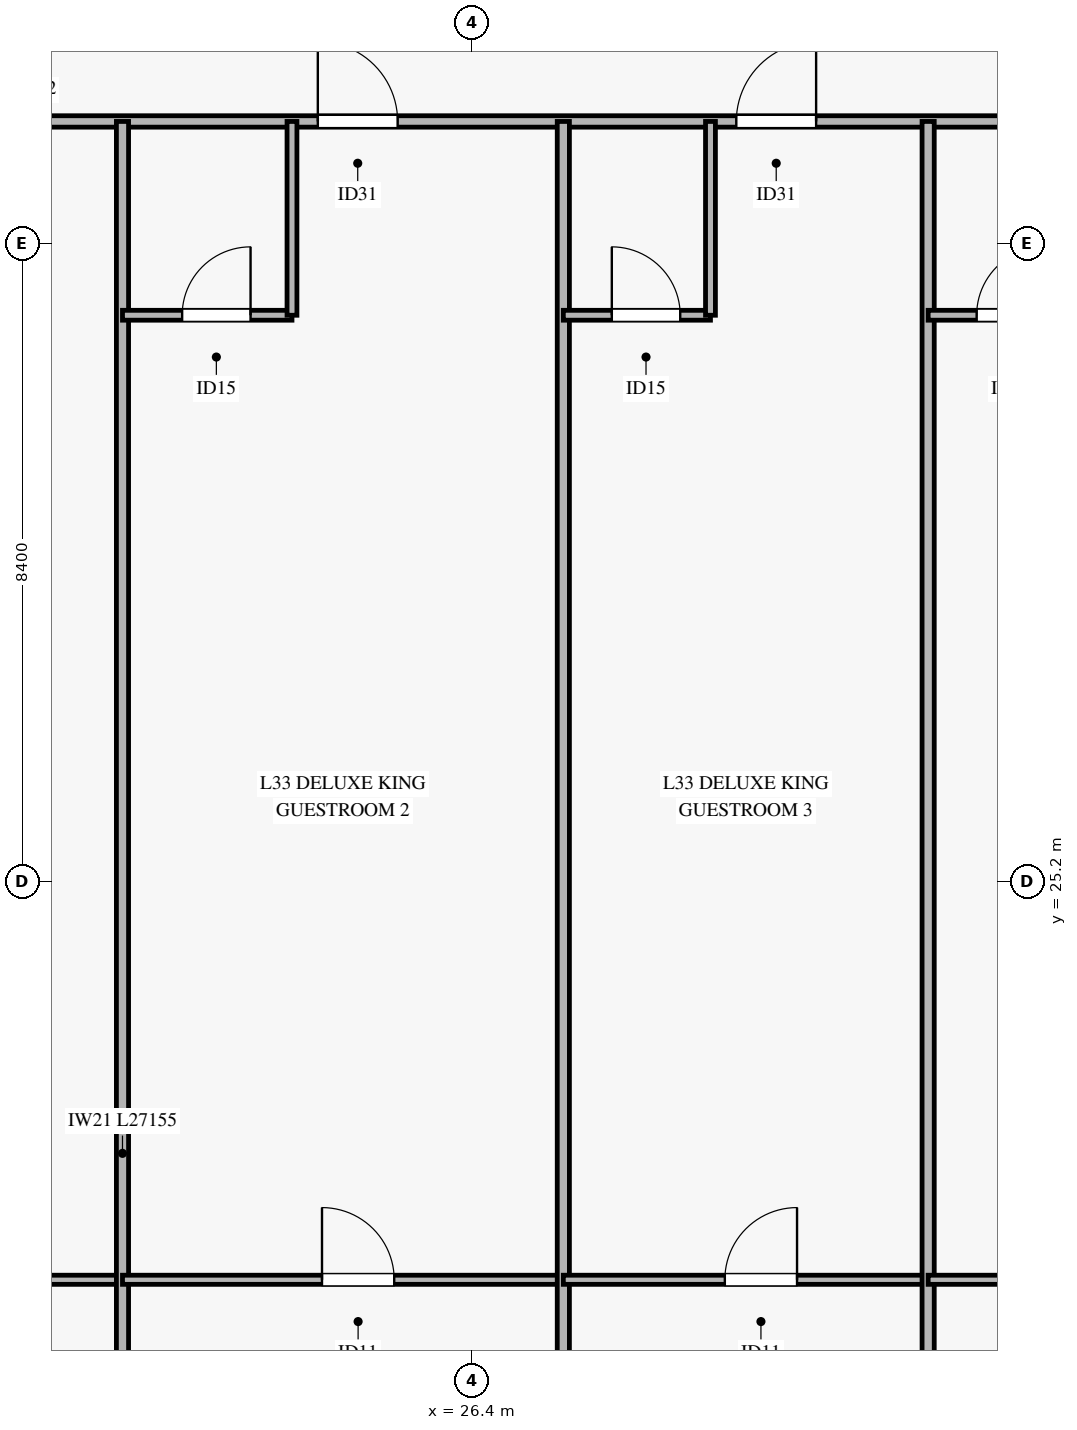
"""IFC4 building model, lengths in metres.
Left out: names, types, materials, properties, quantities, classifications, styles, units other than length and angle.
Written with IfcOpenShell. Run it as: python <this file> out.ifc"""

import sys

from ifc_helpers import new_model, si_unit, direction, frame, frame_2d, origin, place, context, subcontext, project, spatial, rectangle, extrude, source, transform, mapped, element, fill, save


model = new_model("IFC4")
c1 = context("Model", 3, precision=1e-05, world=origin(), true_north=direction((0.0, 1.0)))
c2 = subcontext(c1, "Body", "Model", "MODEL_VIEW")
j1 = project(units=[si_unit("LENGTHUNIT", "METRE"), si_unit("PLANEANGLEUNIT", "RADIAN")], contexts=[c1])
p1 = place(None, origin())
s1 = spatial("IfcSite", under=j1, at=p1, CompositionType="ELEMENT")
p2 = place(p1, origin())
s2 = spatial("IfcBuilding", under=s1, at=p2, CompositionType="ELEMENT")
p3 = place(p2, frame((0.0, 0.0, 137.7)))
s3 = spatial("IfcBuildingStorey", under=s2, at=p3, CompositionType="ELEMENT", Elevation=137.7)
p4 = place(p3, frame((5.214, 35.2, 0.0), z_axis=(0.0, 0.0, 1.0), x_axis=(1.0, 0.0, 0.0)))
e1 = element("IfcWall", 1, at=p4, inside=s3, PredefinedType="PARTITIONING", context=c2, shape_type="SweptSolid", body=[
    extrude(rectangle(XDim=59.972, YDim=0.15, at=frame_2d((29.986, 0.0))), origin(), (0.0, 0.0, 1.0), 2.455),
])
p5 = place(p4, frame((2.77, 0.0, 0.0)))
e2 = element("IfcOpeningElement", 2, at=p5, cuts=e1, PredefinedType="OPENING", context=c2, shape_type="SweptSolid", body=[
    extrude(rectangle(XDim=1.05, YDim=2.15, at=frame_2d((0.525, 1.075))), frame((0.0, 0.085, 0.0), z_axis=(0.0, -1.0, 0.0), x_axis=(1.0, 0.0, 0.0)), (0.0, 0.0, 1.0), 0.17),
])
p6 = place(p4, frame((19.156, 0.0, 0.0)))
e3 = element("IfcOpeningElement", 3, at=p6, cuts=e1, PredefinedType="OPENING", context=c2, shape_type="SweptSolid", body=[
    extrude(rectangle(XDim=1.05, YDim=2.15, at=frame_2d((0.525, 1.075))), frame((0.0, 0.085, 0.0), z_axis=(0.0, -1.0, 0.0), x_axis=(1.0, 0.0, 0.0)), (0.0, 0.0, 1.0), 0.17),
])
p7 = place(p4, frame((24.662, 0.0, 0.0)))
e4 = element("IfcOpeningElement", 4, at=p7, cuts=e1, PredefinedType="OPENING", context=c2, shape_type="SweptSolid", body=[
    extrude(rectangle(XDim=1.05, YDim=2.15, at=frame_2d((0.525, 1.075))), frame((0.0, 0.085, 0.0), z_axis=(0.0, -1.0, 0.0), x_axis=(1.0, 0.0, 0.0)), (0.0, 0.0, 1.0), 0.17),
])
p8 = place(p4, frame((29.462, 0.0, 0.0)))
e5 = element("IfcOpeningElement", 5, at=p8, cuts=e1, PredefinedType="OPENING", context=c2, shape_type="SweptSolid", body=[
    extrude(rectangle(XDim=1.05, YDim=2.15, at=frame_2d((0.525, 1.075))), frame((0.0, 0.085, 0.0), z_axis=(0.0, -1.0, 0.0), x_axis=(1.0, 0.0, 0.0)), (0.0, 0.0, 1.0), 0.17),
])
p9 = place(p4, frame((34.262, 0.0, 0.0)))
e6 = element("IfcOpeningElement", 6, at=p9, cuts=e1, PredefinedType="OPENING", context=c2, shape_type="SweptSolid", body=[
    extrude(rectangle(XDim=1.05, YDim=2.15, at=frame_2d((0.525, 1.075))), frame((0.0, 0.085, 0.0), z_axis=(0.0, -1.0, 0.0), x_axis=(1.0, 0.0, 0.0)), (0.0, 0.0, 1.0), 0.17),
])
p10 = place(p4, frame((38.806, 0.0, 0.0)))
e7 = element("IfcOpeningElement", 7, at=p10, cuts=e1, PredefinedType="OPENING", context=c2, shape_type="SweptSolid", body=[
    extrude(rectangle(XDim=1.05, YDim=2.15, at=frame_2d((0.525, 1.075))), frame((0.0, 0.085, 0.0), z_axis=(0.0, -1.0, 0.0), x_axis=(1.0, 0.0, 0.0)), (0.0, 0.0, 1.0), 0.17),
])
p11 = place(p4, frame((42.956, 0.0, 0.0)))
e8 = element("IfcOpeningElement", 8, at=p11, cuts=e1, PredefinedType="OPENING", context=c2, shape_type="SweptSolid", body=[
    extrude(rectangle(XDim=1.05, YDim=2.15, at=frame_2d((0.525, 1.075))), frame((0.0, 0.085, 0.0), z_axis=(0.0, -1.0, 0.0), x_axis=(1.0, 0.0, 0.0)), (0.0, 0.0, 1.0), 0.17),
])
p12 = place(p3, frame((5.214, 19.959, 0.0), z_axis=(0.0, 0.0, 1.0), x_axis=(1.0, 0.0, 0.0)))
e9 = element("IfcWall", 9, at=p12, inside=s3, PredefinedType="PARTITIONING", context=c2, shape_type="SweptSolid", body=[
    extrude(rectangle(XDim=16.586, YDim=0.12, at=frame_2d((8.293, 0.0))), origin(), (0.0, 0.0, 1.0), 2.455),
])
p13 = place(p12, frame((8.118, 0.0, 0.0)))
e10 = element("IfcOpeningElement", 10, at=p13, cuts=e9, PredefinedType="OPENING", context=c2, shape_type="SweptSolid", body=[
    extrude(rectangle(XDim=0.95, YDim=2.1, at=frame_2d((0.475, 1.05))), frame((0.0, 0.07, 0.0), z_axis=(0.0, -1.0, 0.0), x_axis=(1.0, 0.0, 0.0)), (0.0, 0.0, 1.0), 0.14),
])
p14 = place(p3, frame((21.8, 8.045, 0.0), z_axis=(0.0, 0.0, 1.0), x_axis=(0.0, 1.0, 0.0)))
e11 = element("IfcWall", 11, at=p14, inside=s3, PredefinedType="PARTITIONING", context=c2, shape_type="SweptSolid", body=[
    extrude(rectangle(XDim=27.155, YDim=0.16, at=frame_2d((13.578, 0.0))), origin(), (0.0, 0.0, 1.0), 2.755),
])
p15 = place(p3, frame((21.8, 32.65, 0.0), z_axis=(0.0, 0.0, 1.0), x_axis=(1.0, 0.0, 0.0)))
e12 = element("IfcWall", 12, at=p15, inside=s3, PredefinedType="PARTITIONING", context=c2, shape_type="SweptSolid", body=[
    extrude(rectangle(XDim=2.23, YDim=0.13, at=frame_2d((1.115, 0.0))), origin(), (0.0, 0.0, 1.0), 2.805),
])
p16 = place(p15, frame((0.785, 0.0, 0.0)))
e13 = element("IfcOpeningElement", 13, at=p16, cuts=e12, PredefinedType="OPENING", context=c2, shape_type="SweptSolid", body=[
    extrude(rectangle(XDim=0.9, YDim=2.1, at=frame_2d((0.45, 1.05))), frame((0.0, 0.075, 0.0), z_axis=(0.0, -1.0, 0.0), x_axis=(1.0, 0.0, 0.0)), (0.0, 0.0, 1.0), 0.15),
])
p17 = place(p3, frame((24.03, 32.65, 0.0), z_axis=(0.0, 0.0, 1.0), x_axis=(0.0, 1.0, 0.0)))
e14 = element("IfcWall", 14, at=p17, inside=s3, PredefinedType="PARTITIONING", context=c2, shape_type="SweptSolid", body=[
    extrude(rectangle(XDim=2.55, YDim=0.13, at=frame_2d((1.275, 0.0))), origin(), (0.0, 0.0, 1.0), 3.27),
])
p18 = place(p3, frame((21.8, 19.959, 0.0), z_axis=(0.0, 0.0, 1.0), x_axis=(1.0, 0.0, 0.0)))
e15 = element("IfcWall", 15, at=p18, inside=s3, PredefinedType="PARTITIONING", context=c2, shape_type="SweptSolid", body=[
    extrude(rectangle(XDim=5.8, YDim=0.12, at=frame_2d((2.9, 0.0))), origin(), (0.0, 0.0, 1.0), 3.27),
])
p19 = place(p18, frame((2.625, 0.0, 0.0)))
e16 = element("IfcOpeningElement", 16, at=p19, cuts=e15, PredefinedType="OPENING", context=c2, shape_type="SweptSolid", body=[
    extrude(rectangle(XDim=0.95, YDim=2.1, at=frame_2d((0.475, 1.05))), frame((0.0, 0.07, 0.0), z_axis=(0.0, -1.0, 0.0), x_axis=(1.0, 0.0, 0.0)), (0.0, 0.0, 1.0), 0.14),
])
p20 = place(p3, frame((27.6, 8.045, 0.0), z_axis=(0.0, 0.0, 1.0), x_axis=(0.0, 1.0, 0.0)))
e17 = element("IfcWall", 17, at=p20, inside=s3, PredefinedType="PARTITIONING", context=c2, shape_type="SweptSolid", body=[
    extrude(rectangle(XDim=27.155, YDim=0.16, at=frame_2d((13.578, 0.0))), origin(), (0.0, 0.0, 1.0), 2.755),
])
p21 = place(p3, frame((27.6, 32.65, 0.0), z_axis=(0.0, 0.0, 1.0), x_axis=(1.0, 0.0, 0.0)))
e18 = element("IfcWall", 18, at=p21, inside=s3, PredefinedType="PARTITIONING", context=c2, shape_type="SweptSolid", body=[
    extrude(rectangle(XDim=1.936, YDim=0.13, at=frame_2d((0.968, 0.0))), origin(), (0.0, 0.0, 1.0), 2.805),
])
p22 = place(p21, frame((0.638, 0.0, 0.0)))
e19 = element("IfcOpeningElement", 19, at=p22, cuts=e18, PredefinedType="OPENING", context=c2, shape_type="SweptSolid", body=[
    extrude(rectangle(XDim=0.9, YDim=2.1, at=frame_2d((0.45, 1.05))), frame((0.0, 0.075, 0.0), z_axis=(0.0, -1.0, 0.0), x_axis=(1.0, 0.0, 0.0)), (0.0, 0.0, 1.0), 0.15),
])
p23 = place(p3, frame((29.536, 32.65, 0.0), z_axis=(0.0, 0.0, 1.0), x_axis=(0.0, 1.0, 0.0)))
e20 = element("IfcWall", 20, at=p23, inside=s3, PredefinedType="PARTITIONING", context=c2, shape_type="SweptSolid", body=[
    extrude(rectangle(XDim=2.55, YDim=0.13, at=frame_2d((1.275, 0.0))), origin(), (0.0, 0.0, 1.0), 3.27),
])
p24 = place(p3, frame((27.6, 19.959, 0.0), z_axis=(0.0, 0.0, 1.0), x_axis=(1.0, 0.0, 0.0)))
e21 = element("IfcWall", 21, at=p24, inside=s3, PredefinedType="PARTITIONING", context=c2, shape_type="SweptSolid", body=[
    extrude(rectangle(XDim=4.8, YDim=0.12, at=frame_2d((2.4, 0.0))), origin(), (0.0, 0.0, 1.0), 2.455),
])
p25 = place(p24, frame((2.125, 0.0, 0.0)))
e22 = element("IfcOpeningElement", 22, at=p25, cuts=e21, PredefinedType="OPENING", context=c2, shape_type="SweptSolid", body=[
    extrude(rectangle(XDim=0.95, YDim=2.1, at=frame_2d((0.475, 1.05))), frame((0.0, 0.07, 0.0), z_axis=(0.0, -1.0, 0.0), x_axis=(1.0, 0.0, 0.0)), (0.0, 0.0, 1.0), 0.14),
])
p26 = place(p3, frame((32.4, 8.045, 0.0), z_axis=(0.0, 0.0, 1.0), x_axis=(0.0, 1.0, 0.0)))
e23 = element("IfcWall", 23, at=p26, inside=s3, PredefinedType="PARTITIONING", context=c2, shape_type="SweptSolid", body=[
    extrude(rectangle(XDim=27.155, YDim=0.16, at=frame_2d((13.578, 0.0))), origin(), (0.0, 0.0, 1.0), 2.755),
])
p27 = place(p3, frame((32.4, 32.65, 0.0), z_axis=(0.0, 0.0, 1.0), x_axis=(1.0, 0.0, 0.0)))
e24 = element("IfcWall", 24, at=p27, inside=s3, PredefinedType="PARTITIONING", context=c2, shape_type="SweptSolid", body=[
    extrude(rectangle(XDim=1.936, YDim=0.13, at=frame_2d((0.968, 0.0))), origin(), (0.0, 0.0, 1.0), 2.805),
])
p28 = place(p27, frame((0.638, 0.0, 0.0)))
e25 = element("IfcOpeningElement", 25, at=p28, cuts=e24, PredefinedType="OPENING", context=c2, shape_type="SweptSolid", body=[
    extrude(rectangle(XDim=0.9, YDim=2.1, at=frame_2d((0.45, 1.05))), frame((0.0, 0.075, 0.0), z_axis=(0.0, -1.0, 0.0), x_axis=(1.0, 0.0, 0.0)), (0.0, 0.0, 1.0), 0.15),
])
p29 = place(p3, frame((32.4, 19.959, 0.0), z_axis=(0.0, 0.0, 1.0), x_axis=(1.0, 0.0, 0.0)))
e26 = element("IfcWall", 26, at=p29, inside=s3, PredefinedType="PARTITIONING", context=c2, shape_type="SweptSolid", body=[
    extrude(rectangle(XDim=4.8, YDim=0.12, at=frame_2d((2.4, 0.0))), origin(), (0.0, 0.0, 1.0), 3.27),
])
p30 = place(p29, frame((2.125, 0.0, 0.0)))
e27 = element("IfcOpeningElement", 27, at=p30, cuts=e26, PredefinedType="OPENING", context=c2, shape_type="SweptSolid", body=[
    extrude(rectangle(XDim=0.95, YDim=2.1, at=frame_2d((0.475, 1.05))), frame((0.0, 0.07, 0.0), z_axis=(0.0, -1.0, 0.0), x_axis=(1.0, 0.0, 0.0)), (0.0, 0.0, 1.0), 0.14),
])
m1 = source(origin(), c2, "Body", "SweptSolid", [
    extrude(rectangle(XDim=1.05, YDim=2.15, at=frame_2d((0.525, 1.075))), frame((0.0, 0.025, 0.0), z_axis=(0.0, -1.0, 0.0), x_axis=(1.0, 0.0, 0.0)), (0.0, 0.0, 1.0), 0.05),
])
p31 = place(p6, origin())
e28 = element("IfcDoor", 28, at=p31, inside=s3, OperationType="SINGLE_SWING_LEFT", PredefinedType="DOOR", context=c2, shape_type="MappedRepresentation", body=[
    mapped(m1, transform((0.0, 0.0, 0.0), x_axis=(1.0, 0.0, 0.0), y_axis=(0.0, 1.0, 0.0), z_axis=(0.0, 0.0, 1.0), scale=1.0)),
])
fill(e3, e28)
m2 = source(origin(), c2, "Body", "SweptSolid", [
    extrude(rectangle(XDim=0.9, YDim=2.1, at=frame_2d((0.45, 1.05))), frame((0.0, 0.025, 0.0), z_axis=(0.0, -1.0, 0.0), x_axis=(1.0, 0.0, 0.0)), (0.0, 0.0, 1.0), 0.05),
])
p32 = place(p16, origin())
e29 = element("IfcDoor", 29, at=p32, inside=s3, OperationType="SINGLE_SWING_RIGHT", PredefinedType="DOOR", context=c2, shape_type="MappedRepresentation", body=[
    mapped(m2, transform((0.0, 0.0, 0.0), x_axis=(1.0, 0.0, 0.0), y_axis=(0.0, 1.0, 0.0), z_axis=(0.0, 0.0, 1.0), scale=1.0)),
])
fill(e13, e29)
m3 = source(origin(), c2, "Body", "SweptSolid", [
    extrude(rectangle(XDim=0.95, YDim=2.1, at=frame_2d((0.475, 1.05))), frame((0.0, 0.025, 0.0), z_axis=(0.0, -1.0, 0.0), x_axis=(1.0, 0.0, 0.0)), (0.0, 0.0, 1.0), 0.05),
])
p33 = place(p19, origin())
e30 = element("IfcDoor", 30, at=p33, inside=s3, OperationType="SINGLE_SWING_LEFT", PredefinedType="DOOR", context=c2, shape_type="MappedRepresentation", body=[
    mapped(m3, transform((0.0, 0.0, 0.0), x_axis=(1.0, 0.0, 0.0), y_axis=(0.0, 1.0, 0.0), z_axis=(0.0, 0.0, 1.0), scale=1.0)),
])
fill(e16, e30)
p34 = place(p7, origin())
e31 = element("IfcDoor", 31, at=p34, inside=s3, OperationType="SINGLE_SWING_RIGHT", PredefinedType="DOOR", context=c2, shape_type="MappedRepresentation", body=[
    mapped(m1, transform((0.0, 0.0, 0.0), x_axis=(1.0, 0.0, 0.0), y_axis=(0.0, 1.0, 0.0), z_axis=(0.0, 0.0, 1.0), scale=1.0)),
])
fill(e4, e31)
p35 = place(p22, origin())
e32 = element("IfcDoor", 32, at=p35, inside=s3, OperationType="SINGLE_SWING_LEFT", PredefinedType="DOOR", context=c2, shape_type="MappedRepresentation", body=[
    mapped(m2, transform((0.0, 0.0, 0.0), x_axis=(1.0, 0.0, 0.0), y_axis=(0.0, 1.0, 0.0), z_axis=(0.0, 0.0, 1.0), scale=1.0)),
])
fill(e19, e32)
p36 = place(p25, origin())
e33 = element("IfcDoor", 33, at=p36, inside=s3, OperationType="SINGLE_SWING_RIGHT", PredefinedType="DOOR", context=c2, shape_type="MappedRepresentation", body=[
    mapped(m3, transform((0.0, 0.0, 0.0), x_axis=(1.0, 0.0, 0.0), y_axis=(0.0, 1.0, 0.0), z_axis=(0.0, 0.0, 1.0), scale=1.0)),
])
fill(e22, e33)
p37 = place(p28, origin())
e34 = element("IfcDoor", 34, at=p37, inside=s3, OperationType="SINGLE_SWING_RIGHT", PredefinedType="DOOR", context=c2, shape_type="MappedRepresentation", body=[
    mapped(m2, transform((0.0, 0.0, 0.0), x_axis=(1.0, 0.0, 0.0), y_axis=(0.0, 1.0, 0.0), z_axis=(0.0, 0.0, 1.0), scale=1.0)),
])
fill(e25, e34)
save(model, sys.argv[1])
